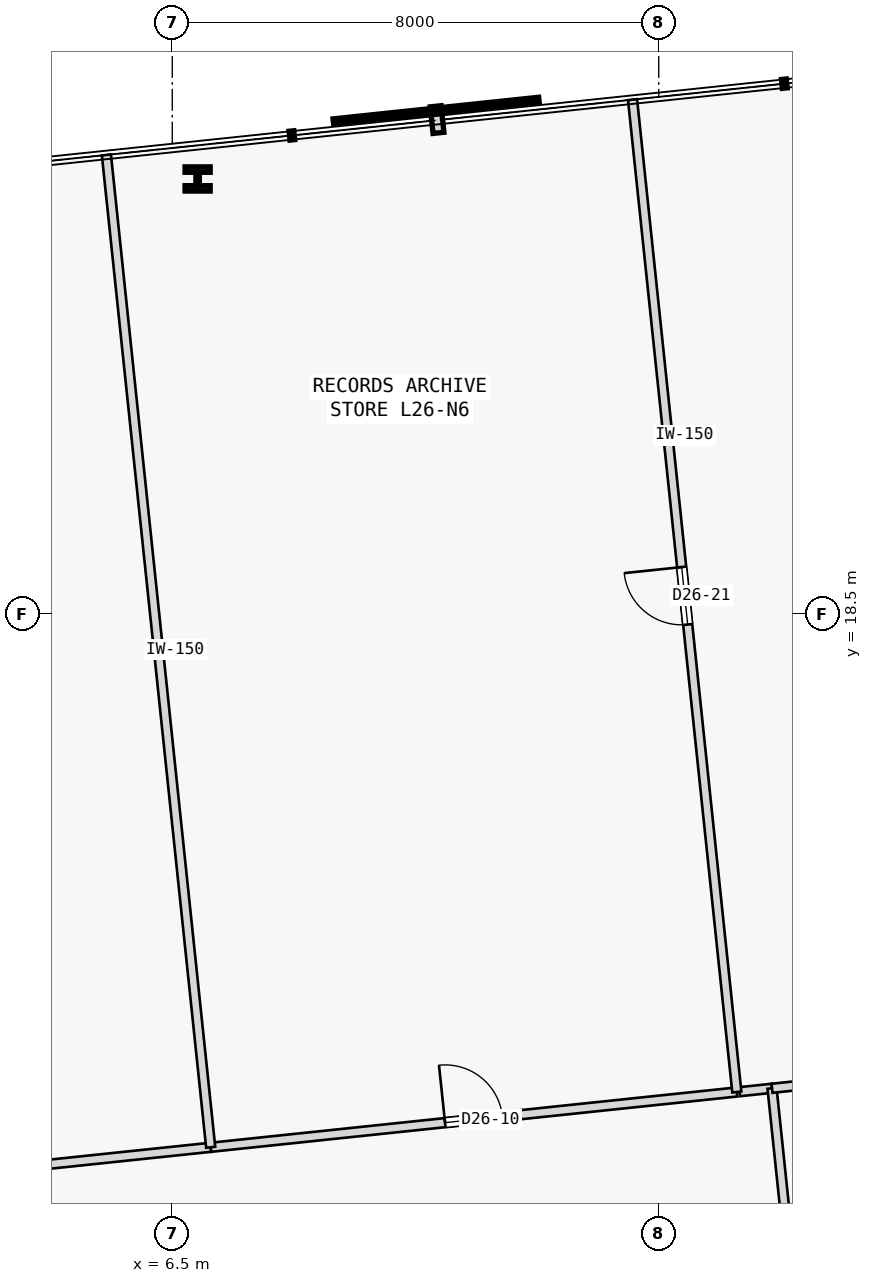
"""IFC4 building model, lengths in metres.
Left out: names, types, materials, properties, quantities, classifications, styles, units other than length and angle.
Written with IfcOpenShell. Run it as: python <this file> out.ifc"""

import sys

from ifc_helpers import new_model, si_unit, direction, frame, frame_2d, origin, origin_2d, place, context, subcontext, project, spatial, rectangle, i_section, extrude, element, fill, save


model = new_model("IFC4")
c1 = context("Model", 3, precision=1e-05, world=origin(), true_north=direction((0.0, 1.0)))
c2 = subcontext(c1, "Body", "Model", "MODEL_VIEW")
j1 = project(units=[si_unit("LENGTHUNIT", "METRE"), si_unit("PLANEANGLEUNIT", "RADIAN")], contexts=[c1])
p1 = place(None, origin())
s1 = spatial("IfcSite", under=j1, at=p1, CompositionType="ELEMENT")
p2 = place(p1, origin())
s2 = spatial("IfcBuilding", under=s1, at=p2, CompositionType="ELEMENT")
p3 = place(p2, frame((0.0, 0.0, 105.9)))
s3 = spatial("IfcBuildingStorey", under=s2, at=p3, CompositionType="ELEMENT", Elevation=105.9)
p4 = place(p3, frame((6.917, 25.658, 0.0), z_axis=(0.0, 0.0, 1.0), x_axis=(1.0, 0.0, 0.0)))
e1 = element("IfcColumn", 1, at=p4, inside=s3, PredefinedType="COLUMN", context=c2, shape_type="SweptSolid", body=[
    extrude(i_section(OverallWidth=0.413, OverallDepth=0.398, WebThickness=0.056, FlangeThickness=0.089, FilletRadius=0.015, at=origin_2d()), origin(), (0.0, 0.0, 1.0), 3.7),
])
p5 = place(p3, frame((-1.52, 8.825, 0.0), z_axis=(0.0, 0.0, 1.0), x_axis=(0.994524503348, 0.104503647022, 0.0)))
e2 = element("IfcWall", 2, at=p5, inside=s3, PredefinedType="PARTITIONING", context=c2, shape_type="SweptSolid", body=[
    extrude(rectangle(XDim=8.7, YDim=0.15, at=frame_2d((4.35, 0.0))), origin(), (0.0, 0.0, 1.0), 3.475),
])
p6 = place(p5, frame((3.875, 0.0, 0.0)))
e3 = element("IfcOpeningElement", 3, at=p6, cuts=e2, PredefinedType="OPENING", context=c2, shape_type="SweptSolid", body=[
    extrude(rectangle(XDim=0.95, YDim=2.15, at=frame_2d((0.475, 1.075))), frame((0.0, 0.085, 0.0), z_axis=(0.0, -1.0, 0.0), x_axis=(1.0, 0.0, 0.0)), (0.0, 0.0, 1.0), 0.17),
])
p7 = place(p3, frame((7.132, 9.734, 0.0), z_axis=(0.0, 0.0, 1.0), x_axis=(0.994521586424, 0.104531402636, 0.0)))
e4 = element("IfcWall", 4, at=p7, inside=s3, PredefinedType="PARTITIONING", context=c2, shape_type="SweptSolid", body=[
    extrude(rectangle(XDim=8.7, YDim=0.15, at=frame_2d((4.35, 0.0))), origin(), (0.0, 0.0, 1.0), 3.475),
])
p8 = place(p7, frame((3.875, 0.0, 0.0)))
e5 = element("IfcOpeningElement", 5, at=p8, cuts=e4, PredefinedType="OPENING", context=c2, shape_type="SweptSolid", body=[
    extrude(rectangle(XDim=0.95, YDim=2.15, at=frame_2d((0.475, 1.075))), frame((0.0, 0.085, 0.0), z_axis=(0.0, -1.0, 0.0), x_axis=(1.0, 0.0, 0.0)), (0.0, 0.0, 1.0), 0.17),
])
p9 = place(p3, frame((15.829, 10.648, 0.0), z_axis=(0.0, 0.0, 1.0), x_axis=(0.994567544876, 0.104093221104, 0.0)))
e6 = element("IfcWall", 6, at=p9, inside=s3, PredefinedType="PARTITIONING", context=c2, shape_type="SweptSolid", body=[
    extrude(rectangle(XDim=0.537, YDim=0.15, at=frame_2d((0.269, 0.0))), origin(), (0.0, 0.0, 1.0), 3.475),
])
p10 = place(p3, frame((16.998, 4.662, 0.0), z_axis=(0.0, 0.0, 1.0), x_axis=(-0.104515354875, 0.994523273029, 0.0)))
e7 = element("IfcWall", 7, at=p10, inside=s3, PredefinedType="PARTITIONING", context=c2, shape_type="SweptSolid", body=[
    extrude(rectangle(XDim=6.076, YDim=0.15, at=frame_2d((3.038, 0.0))), origin(), (0.0, 0.0, 1.0), 3.475),
])
p11 = place(p10, frame((2.563, 0.0, 0.0)))
e8 = element("IfcOpeningElement", 8, at=p11, cuts=e7, PredefinedType="OPENING", context=c2, shape_type="SweptSolid", body=[
    extrude(rectangle(XDim=0.95, YDim=2.15, at=frame_2d((0.475, 1.075))), frame((0.0, 0.085, 0.0), z_axis=(0.0, -1.0, 0.0), x_axis=(1.0, 0.0, 0.0)), (0.0, 0.0, 1.0), 0.17),
])
p12 = place(p3, frame((7.132, 9.734, 0.0), z_axis=(0.0, 0.0, 1.0), x_axis=(-0.104521364336, 0.99452264147, 0.0)))
e9 = element("IfcWall", 9, at=p12, inside=s3, PredefinedType="PARTITIONING", context=c2, shape_type="SweptSolid", body=[
    extrude(rectangle(XDim=16.409, YDim=0.15, at=frame_2d((8.205, 0.0))), origin(), (0.0, 0.0, 1.0), 3.475),
])
p13 = place(p3, frame((15.784, 10.643, 0.0), z_axis=(0.0, 0.0, 1.0), x_axis=(-0.104521364336, 0.99452264147, 0.0)))
e10 = element("IfcWall", 10, at=p13, inside=s3, PredefinedType="PARTITIONING", context=c2, shape_type="SweptSolid", body=[
    extrude(rectangle(XDim=16.409, YDim=0.15, at=frame_2d((8.205, 0.0))), origin(), (0.0, 0.0, 1.0), 3.475),
])
p14 = place(p13, frame((7.729, 0.0, 0.0)))
e11 = element("IfcOpeningElement", 11, at=p14, cuts=e10, PredefinedType="OPENING", context=c2, shape_type="SweptSolid", body=[
    extrude(rectangle(XDim=0.95, YDim=2.15, at=frame_2d((0.475, 1.075))), frame((0.0, 0.085, 0.0), z_axis=(0.0, -1.0, 0.0), x_axis=(1.0, 0.0, 0.0)), (0.0, 0.0, 1.0), 0.17),
])
p15 = place(p3, frame((16.363, 10.704, 0.0), z_axis=(0.0, 0.0, 1.0), x_axis=(0.994519557807, 0.104550701289, 0.0)))
e12 = element("IfcWall", 12, at=p15, inside=s3, PredefinedType="PARTITIONING", context=c2, shape_type="SweptSolid", body=[
    extrude(rectangle(XDim=7.393, YDim=0.15, at=frame_2d((3.697, 0.0))), origin(), (0.0, 0.0, 1.0), 3.475),
])
p16 = place(p8, origin())
e13 = element("IfcDoor", 13, at=p16, inside=s3, OperationType="SINGLE_SWING_LEFT", PredefinedType="DOOR", context=c2, shape_type="SweptSolid", body=[
    extrude(rectangle(XDim=0.95, YDim=2.15, at=frame_2d((0.475, 1.075))), frame((0.0, 0.025, 0.0), z_axis=(0.0, -1.0, 0.0), x_axis=(1.0, 0.0, 0.0)), (0.0, 0.0, 1.0), 0.05),
])
fill(e5, e13)
p17 = place(p14, origin())
e14 = element("IfcDoor", 14, at=p17, inside=s3, OperationType="SINGLE_SWING_RIGHT", PredefinedType="DOOR", context=c2, shape_type="SweptSolid", body=[
    extrude(rectangle(XDim=0.95, YDim=2.15, at=frame_2d((0.475, 1.075))), frame((0.0, 0.025, 0.0), z_axis=(0.0, -1.0, 0.0), x_axis=(1.0, 0.0, 0.0)), (0.0, 0.0, 1.0), 0.05),
])
fill(e11, e14)
save(model, sys.argv[1])
